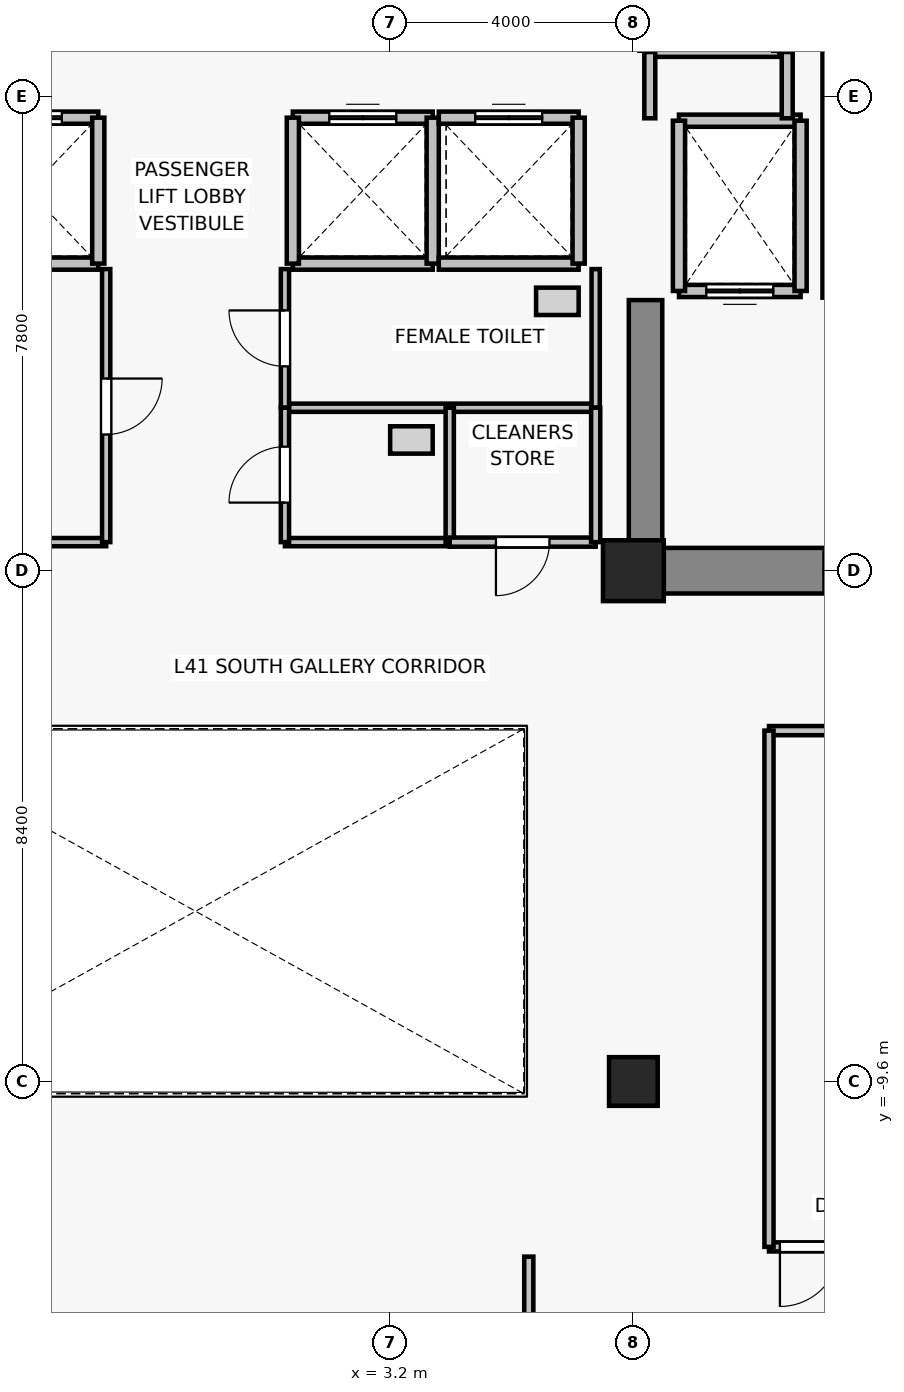
"""IFC4 building model, lengths in metres.
Left out: names, types, materials, properties, quantities, classifications, styles, units other than length and angle.
Written with IfcOpenShell. Run it as: python <this file> out.ifc"""

import sys

from ifc_helpers import new_model, si_unit, direction, frame, frame_2d, origin, origin_2d, place, context, subcontext, project, spatial, rectangle, extrude, source, transform, mapped, element, fill, save


model = new_model("IFC4")
c1 = context("Model", 3, precision=1e-05, world=origin(), true_north=direction((0.0, 1.0)))
c2 = subcontext(c1, "Body", "Model", "MODEL_VIEW")
j1 = project(units=[si_unit("LENGTHUNIT", "METRE"), si_unit("PLANEANGLEUNIT", "RADIAN")], contexts=[c1])
p1 = place(None, origin())
s1 = spatial("IfcSite", under=j1, at=p1, CompositionType="ELEMENT")
p2 = place(p1, origin())
s2 = spatial("IfcBuilding", under=s1, at=p2, CompositionType="ELEMENT")
p3 = place(p2, frame((0.0, 0.0, 149.5)))
s3 = spatial("IfcBuildingStorey", under=s2, at=p3, CompositionType="ELEMENT", Elevation=149.5)
p4 = place(p3, frame((7.2, -1.2, 0.0), z_axis=(0.0, 0.0, 1.0), x_axis=(1.0, 0.0, 0.0)))
e1 = element("IfcColumn", 1, at=p4, inside=s3, PredefinedType="COLUMN", context=c2, shape_type="SweptSolid", body=[
    extrude(rectangle(XDim=1.0, YDim=1.0, at=origin_2d()), origin(), (0.0, 0.0, 1.0), 3.3),
])
p5 = place(p3, frame((7.2, -9.6, 0.0), z_axis=(0.0, 0.0, 1.0), x_axis=(1.0, 0.0, 0.0)))
e2 = element("IfcColumn", 2, at=p5, inside=s3, PredefinedType="COLUMN", context=c2, shape_type="SweptSolid", body=[
    extrude(rectangle(XDim=0.8, YDim=0.8, at=origin_2d()), origin(), (0.0, 0.0, 1.0), 3.3),
])
p6 = place(p3, frame((13.9, -1.2, 0.0), z_axis=(0.0, 0.0, 1.0), x_axis=(-1.0, 0.0, 0.0)))
e3 = element("IfcWall", 3, at=p6, inside=s3, PredefinedType="SHEAR", context=c2, shape_type="SweptSolid", body=[
    extrude(rectangle(XDim=6.2, YDim=0.75, at=frame_2d((3.1, 0.0))), origin(), (0.0, 0.0, 1.0), 3.075),
])
p7 = place(p6, frame((2.425, 0.0, 0.0)))
e4 = element("IfcOpeningElement", 4, at=p7, cuts=e3, PredefinedType="OPENING", context=c2, shape_type="SweptSolid", body=[
    extrude(rectangle(XDim=1.15, YDim=2.15, at=frame_2d((0.575, 1.075))), frame((0.0, 0.385, 0.0), z_axis=(0.0, -1.0, 0.0), x_axis=(1.0, 0.0, 0.0)), (0.0, 0.0, 1.0), 0.77),
])
p8 = place(p3, frame((7.4, -0.825, 0.0), z_axis=(0.0, 0.0, 1.0), x_axis=(0.0, 1.0, 0.0)))
e5 = element("IfcWall", 5, at=p8, inside=s3, PredefinedType="SHEAR", context=c2, shape_type="SweptSolid", body=[
    extrude(rectangle(XDim=4.075, YDim=0.55, at=frame_2d((2.038, 0.0))), origin(), (0.0, 0.0, 1.0), 3.075),
])
p9 = place(p3, frame((9.95, 3.4, 0.0), z_axis=(0.0, 0.0, 1.0), x_axis=(-1.0, 0.0, 0.0)))
e6 = element("IfcWall", 6, at=p9, inside=s3, PredefinedType="SOLIDWALL", context=c2, shape_type="SweptSolid", body=[
    extrude(rectangle(XDim=2.0, YDim=0.2, at=frame_2d((1.0, 0.0))), origin(), (0.0, 0.0, 1.0), 3.075),
])
p10 = place(p9, frame((0.45, 0.0, 0.0)))
e7 = element("IfcOpeningElement", 7, at=p10, cuts=e6, PredefinedType="OPENING", context=c2, shape_type="SweptSolid", body=[
    extrude(rectangle(XDim=1.1, YDim=2.2, at=frame_2d((0.55, 1.1))), frame((0.0, 0.11, 0.0), z_axis=(0.0, -1.0, 0.0), x_axis=(1.0, 0.0, 0.0)), (0.0, 0.0, 1.0), 0.22),
])
p11 = place(p3, frame((7.95, 6.2, 0.0), z_axis=(0.0, 0.0, 1.0), x_axis=(1.0, 0.0, 0.0)))
e8 = element("IfcWall", 8, at=p11, inside=s3, PredefinedType="SOLIDWALL", context=c2, shape_type="SweptSolid", body=[
    extrude(rectangle(XDim=2.0, YDim=0.2, at=frame_2d((1.0, 0.0))), origin(), (0.0, 0.0, 1.0), 3.075),
])
for number, where, z_axis, x_axis in (
    (9, (7.95, 3.4, 0.0), (0.0, 0.0, 1.0), (0.0, 1.0, 0.0)),
    (10, (9.95, 6.2, 0.0), (0.0, 0.0, 1.0), (0.0, -1.0, 0.0)),
):
    element("IfcWall", number, at=place(p3, frame(where, z_axis=z_axis, x_axis=x_axis)), inside=s3, PredefinedType="SOLIDWALL", context=c2, shape_type="SweptSolid", body=[
        extrude(rectangle(XDim=2.8, YDim=0.2, at=frame_2d((1.4, 0.0))), origin(), (0.0, 0.0, 1.0), 3.075),
    ])
p12 = place(p3, frame((-1.6, 3.85, 0.0), z_axis=(0.0, 0.0, 1.0), x_axis=(-1.0, 0.0, 0.0)))
e11 = element("IfcWall", 11, at=p12, inside=s3, PredefinedType="SOLIDWALL", context=c2, shape_type="SweptSolid", body=[
    extrude(rectangle(XDim=2.3, YDim=0.2, at=frame_2d((1.15, 0.0))), origin(), (0.0, 0.0, 1.0), 3.075),
])
p13 = place(p3, frame((-3.9, 6.25, 0.0), z_axis=(0.0, 0.0, 1.0), x_axis=(1.0, 0.0, 0.0)))
e12 = element("IfcWall", 12, at=p13, inside=s3, PredefinedType="SOLIDWALL", context=c2, shape_type="SweptSolid", body=[
    extrude(rectangle(XDim=2.3, YDim=0.2, at=frame_2d((1.15, 0.0))), origin(), (0.0, 0.0, 1.0), 3.075),
])
p14 = place(p13, frame((0.6, 0.0, 0.0)))
e13 = element("IfcOpeningElement", 13, at=p14, cuts=e12, PredefinedType="OPENING", context=c2, shape_type="SweptSolid", body=[
    extrude(rectangle(XDim=1.1, YDim=2.2, at=frame_2d((0.55, 1.1))), frame((0.0, 0.11, 0.0), z_axis=(0.0, -1.0, 0.0), x_axis=(1.0, 0.0, 0.0)), (0.0, 0.0, 1.0), 0.22),
])
p15 = place(p3, frame((-1.6, 6.25, 0.0), z_axis=(0.0, 0.0, 1.0), x_axis=(0.0, -1.0, 0.0)))
e14 = element("IfcWall", 14, at=p15, inside=s3, PredefinedType="SOLIDWALL", context=c2, shape_type="SweptSolid", body=[
    extrude(rectangle(XDim=2.4, YDim=0.2, at=frame_2d((1.2, 0.0))), origin(), (0.0, 0.0, 1.0), 3.075),
])
p16 = place(p3, frame((3.9, 3.85, 0.0), z_axis=(0.0, 0.0, 1.0), x_axis=(-1.0, 0.0, 0.0)))
e15 = element("IfcWall", 15, at=p16, inside=s3, PredefinedType="SOLIDWALL", context=c2, shape_type="SweptSolid", body=[
    extrude(rectangle(XDim=2.3, YDim=0.2, at=frame_2d((1.15, 0.0))), origin(), (0.0, 0.0, 1.0), 3.075),
])
p17 = place(p3, frame((1.6, 6.25, 0.0), z_axis=(0.0, 0.0, 1.0), x_axis=(1.0, 0.0, 0.0)))
e16 = element("IfcWall", 16, at=p17, inside=s3, PredefinedType="SOLIDWALL", context=c2, shape_type="SweptSolid", body=[
    extrude(rectangle(XDim=2.3, YDim=0.2, at=frame_2d((1.15, 0.0))), origin(), (0.0, 0.0, 1.0), 3.075),
])
p18 = place(p17, frame((0.6, 0.0, 0.0)))
e17 = element("IfcOpeningElement", 17, at=p18, cuts=e16, PredefinedType="OPENING", context=c2, shape_type="SweptSolid", body=[
    extrude(rectangle(XDim=1.1, YDim=2.2, at=frame_2d((0.55, 1.1))), frame((0.0, 0.11, 0.0), z_axis=(0.0, -1.0, 0.0), x_axis=(1.0, 0.0, 0.0)), (0.0, 0.0, 1.0), 0.22),
])
for number, where, z_axis, x_axis in (
    (18, (1.6, 3.85, 0.0), (0.0, 0.0, 1.0), (0.0, 1.0, 0.0)),
    (19, (3.9, 6.25, 0.0), (0.0, 0.0, 1.0), (0.0, -1.0, 0.0)),
):
    element("IfcWall", number, at=place(p3, frame(where, z_axis=z_axis, x_axis=x_axis)), inside=s3, PredefinedType="SOLIDWALL", context=c2, shape_type="SweptSolid", body=[
        extrude(rectangle(XDim=2.4, YDim=0.2, at=frame_2d((1.2, 0.0))), origin(), (0.0, 0.0, 1.0), 3.075),
    ])
p19 = place(p3, frame((6.3, 3.85, 0.0), z_axis=(0.0, 0.0, 1.0), x_axis=(-1.0, 0.0, 0.0)))
e20 = element("IfcWall", 20, at=p19, inside=s3, PredefinedType="SOLIDWALL", context=c2, shape_type="SweptSolid", body=[
    extrude(rectangle(XDim=2.3, YDim=0.2, at=frame_2d((1.15, 0.0))), origin(), (0.0, 0.0, 1.0), 3.075),
])
p20 = place(p3, frame((4.0, 6.25, 0.0), z_axis=(0.0, 0.0, 1.0), x_axis=(1.0, 0.0, 0.0)))
e21 = element("IfcWall", 21, at=p20, inside=s3, PredefinedType="SOLIDWALL", context=c2, shape_type="SweptSolid", body=[
    extrude(rectangle(XDim=2.3, YDim=0.2, at=frame_2d((1.15, 0.0))), origin(), (0.0, 0.0, 1.0), 3.075),
])
p21 = place(p20, frame((0.6, 0.0, 0.0)))
e22 = element("IfcOpeningElement", 22, at=p21, cuts=e21, PredefinedType="OPENING", context=c2, shape_type="SweptSolid", body=[
    extrude(rectangle(XDim=1.1, YDim=2.2, at=frame_2d((0.55, 1.1))), frame((0.0, 0.11, 0.0), z_axis=(0.0, -1.0, 0.0), x_axis=(1.0, 0.0, 0.0)), (0.0, 0.0, 1.0), 0.22),
])
p22 = place(p3, frame((6.3, 6.25, 0.0), z_axis=(0.0, 0.0, 1.0), x_axis=(0.0, -1.0, 0.0)))
e23 = element("IfcWall", 23, at=p22, inside=s3, PredefinedType="SOLIDWALL", context=c2, shape_type="SweptSolid", body=[
    extrude(rectangle(XDim=2.4, YDim=0.2, at=frame_2d((1.2, 0.0))), origin(), (0.0, 0.0, 1.0), 3.075),
])
p23 = place(p3, frame((9.6, 7.35, 0.0), z_axis=(0.0, 0.0, 1.0), x_axis=(-1.0, 0.0, 0.0)))
e24 = element("IfcWall", 24, at=p23, inside=s3, PredefinedType="SOLIDWALL", context=c2, shape_type="SweptSolid", body=[
    extrude(rectangle(XDim=2.2, YDim=0.2, at=frame_2d((1.1, 0.0))), origin(), (0.0, 0.0, 1.0), 2.565),
])
p24 = place(p3, frame((10.41, 3.29, 0.0), z_axis=(0.0, 0.0, 1.0), x_axis=(0.0, 1.0, 0.0)))
e25 = element("IfcWall", 25, at=p24, inside=s3, PredefinedType="SOLIDWALL", context=c2, shape_type="SweptSolid", body=[
    extrude(rectangle(XDim=8.84, YDim=0.2, at=frame_2d((4.42, 0.0))), origin(), (0.0, 0.0, 1.0), 3.075),
])
p25 = place(p3, frame((7.47, 6.24, 0.0), z_axis=(0.0, 0.0, 1.0), x_axis=(0.0, 1.0, 0.0)))
e26 = element("IfcWall", 26, at=p25, inside=s3, PredefinedType="PARTITIONING", context=c2, shape_type="SweptSolid", body=[
    extrude(rectangle(XDim=1.09, YDim=0.18, at=frame_2d((0.545, 0.0))), origin(), (0.0, 0.0, 1.0), 2.565),
])
p26 = place(p3, frame((9.73, 7.33, 0.0), z_axis=(0.0, 0.0, 1.0), x_axis=(0.0, -1.0, 0.0)))
e27 = element("IfcWall", 27, at=p26, inside=s3, PredefinedType="PARTITIONING", context=c2, shape_type="SweptSolid", body=[
    extrude(rectangle(XDim=1.09, YDim=0.18, at=frame_2d((0.545, 0.0))), origin(), (0.0, 0.0, 1.0), 3.075),
])
p27 = place(p3, frame((-1.47, -0.73, 0.0), z_axis=(0.0, 0.0, 1.0), x_axis=(-1.0, 0.0, 0.0)))
e28 = element("IfcWall", 28, at=p27, inside=s3, PredefinedType="PARTITIONING", context=c2, shape_type="SweptSolid", body=[
    extrude(rectangle(XDim=5.11, YDim=0.135, at=frame_2d((2.555, 0.0))), origin(), (0.0, 0.0, 1.0), 3.075),
])
p28 = place(p3, frame((-1.47, 3.76, 0.0), z_axis=(0.0, 0.0, 1.0), x_axis=(0.0, -1.0, 0.0)))
e29 = element("IfcWall", 29, at=p28, inside=s3, PredefinedType="PARTITIONING", context=c2, shape_type="SweptSolid", body=[
    extrude(rectangle(XDim=4.49, YDim=0.135, at=frame_2d((2.245, 0.0))), origin(), (0.0, 0.0, 1.0), 3.075),
])
p29 = place(p28, frame((1.8, 0.0, 0.0)))
e30 = element("IfcOpeningElement", 30, at=p29, cuts=e29, PredefinedType="OPENING", context=c2, shape_type="SweptSolid", body=[
    extrude(rectangle(XDim=0.92, YDim=2.1, at=frame_2d((0.46, 1.05))), frame((0.0, 0.077, 0.0), z_axis=(0.0, -1.0, 0.0), x_axis=(1.0, 0.0, 0.0)), (0.0, 0.0, 1.0), 0.155),
])
p30 = place(p3, frame((6.58, 1.48, 0.0), z_axis=(0.0, 0.0, 1.0), x_axis=(-1.0, 0.0, 0.0)))
e31 = element("IfcWall", 31, at=p30, inside=s3, PredefinedType="PARTITIONING", context=c2, shape_type="SweptSolid", body=[
    extrude(rectangle(XDim=5.11, YDim=0.135, at=frame_2d((2.555, 0.0))), origin(), (0.0, 0.0, 1.0), 3.075),
])
p31 = place(p3, frame((1.47, 1.48, 0.0), z_axis=(0.0, 0.0, 1.0), x_axis=(0.0, 1.0, 0.0)))
e32 = element("IfcWall", 32, at=p31, inside=s3, PredefinedType="PARTITIONING", context=c2, shape_type="SweptSolid", body=[
    extrude(rectangle(XDim=2.28, YDim=0.135, at=frame_2d((1.14, 0.0))), origin(), (0.0, 0.0, 1.0), 3.075),
])
p32 = place(p31, frame((0.68, 0.0, 0.0)))
e33 = element("IfcOpeningElement", 33, at=p32, cuts=e32, PredefinedType="OPENING", context=c2, shape_type="SweptSolid", body=[
    extrude(rectangle(XDim=0.92, YDim=2.1, at=frame_2d((0.46, 1.05))), frame((0.0, 0.077, 0.0), z_axis=(0.0, -1.0, 0.0), x_axis=(1.0, 0.0, 0.0)), (0.0, 0.0, 1.0), 0.155),
])
p33 = place(p3, frame((6.58, 3.76, 0.0), z_axis=(0.0, 0.0, 1.0), x_axis=(0.0, -1.0, 0.0)))
e34 = element("IfcWall", 34, at=p33, inside=s3, PredefinedType="PARTITIONING", context=c2, shape_type="SweptSolid", body=[
    extrude(rectangle(XDim=2.28, YDim=0.135, at=frame_2d((1.14, 0.0))), origin(), (0.0, 0.0, 1.0), 3.075),
])
p34 = place(p3, frame((4.18, -0.73, 0.0), z_axis=(0.0, 0.0, 1.0), x_axis=(-1.0, 0.0, 0.0)))
e35 = element("IfcWall", 35, at=p34, inside=s3, PredefinedType="PARTITIONING", context=c2, shape_type="SweptSolid", body=[
    extrude(rectangle(XDim=2.71, YDim=0.135, at=frame_2d((1.355, 0.0))), origin(), (0.0, 0.0, 1.0), 3.075),
])
p35 = place(p3, frame((1.47, -0.73, 0.0), z_axis=(0.0, 0.0, 1.0), x_axis=(0.0, 1.0, 0.0)))
e36 = element("IfcWall", 36, at=p35, inside=s3, PredefinedType="PARTITIONING", context=c2, shape_type="SweptSolid", body=[
    extrude(rectangle(XDim=2.21, YDim=0.135, at=frame_2d((1.105, 0.0))), origin(), (0.0, 0.0, 1.0), 3.075),
])
p36 = place(p35, frame((0.65, 0.0, 0.0)))
e37 = element("IfcOpeningElement", 37, at=p36, cuts=e36, PredefinedType="OPENING", context=c2, shape_type="SweptSolid", body=[
    extrude(rectangle(XDim=0.92, YDim=2.1, at=frame_2d((0.46, 1.05))), frame((0.0, 0.077, 0.0), z_axis=(0.0, -1.0, 0.0), x_axis=(1.0, 0.0, 0.0)), (0.0, 0.0, 1.0), 0.155),
])
p37 = place(p3, frame((4.18, 1.48, 0.0), z_axis=(0.0, 0.0, 1.0), x_axis=(0.0, -1.0, 0.0)))
e38 = element("IfcWall", 38, at=p37, inside=s3, PredefinedType="PARTITIONING", context=c2, shape_type="SweptSolid", body=[
    extrude(rectangle(XDim=2.21, YDim=0.135, at=frame_2d((1.105, 0.0))), origin(), (0.0, 0.0, 1.0), 3.075),
])
p38 = place(p3, frame((6.58, -0.73, 0.0), z_axis=(0.0, 0.0, 1.0), x_axis=(-1.0, 0.0, 0.0)))
e39 = element("IfcWall", 39, at=p38, inside=s3, PredefinedType="PARTITIONING", context=c2, shape_type="SweptSolid", body=[
    extrude(rectangle(XDim=2.4, YDim=0.15, at=frame_2d((1.2, 0.0))), origin(), (0.0, 0.0, 1.0), 3.075),
])
p39 = place(p38, frame((0.76, 0.0, 0.0)))
e40 = element("IfcOpeningElement", 40, at=p39, cuts=e39, PredefinedType="OPENING", context=c2, shape_type="SweptSolid", body=[
    extrude(rectangle(XDim=0.88, YDim=2.1, at=frame_2d((0.44, 1.05))), frame((0.0, 0.085, 0.0), z_axis=(0.0, -1.0, 0.0), x_axis=(1.0, 0.0, 0.0)), (0.0, 0.0, 1.0), 0.17),
])
p40 = place(p3, frame((6.58, 1.48, 0.0), z_axis=(0.0, 0.0, 1.0), x_axis=(0.0, -1.0, 0.0)))
e41 = element("IfcWall", 41, at=p40, inside=s3, PredefinedType="PARTITIONING", context=c2, shape_type="SweptSolid", body=[
    extrude(rectangle(XDim=2.21, YDim=0.15, at=frame_2d((1.105, 0.0))), origin(), (0.0, 0.0, 1.0), 3.075),
])
p41 = place(p3, frame((22.53, -12.32, 0.0), z_axis=(0.0, 0.0, 1.0), x_axis=(-1.0, 0.0, 0.0)))
e42 = element("IfcWall", 42, at=p41, inside=s3, PredefinedType="PARTITIONING", context=c2, shape_type="SweptSolid", body=[
    extrude(rectangle(XDim=13.1, YDim=0.15, at=frame_2d((6.55, 0.0))), origin(), (0.0, 0.0, 1.0), 2.565),
])
p42 = place(p41, frame((11.94, 0.0, 0.0)))
e43 = element("IfcOpeningElement", 43, at=p42, cuts=e42, PredefinedType="OPENING", context=c2, shape_type="SweptSolid", body=[
    extrude(rectangle(XDim=0.98, YDim=2.15, at=frame_2d((0.49, 1.075))), frame((0.0, 0.085, 0.0), z_axis=(0.0, -1.0, 0.0), x_axis=(1.0, 0.0, 0.0)), (0.0, 0.0, 1.0), 0.17),
])
p43 = place(p3, frame((9.43, -3.83, 0.0), z_axis=(0.0, 0.0, 1.0), x_axis=(1.0, 0.0, 0.0)))
e44 = element("IfcWall", 44, at=p43, inside=s3, PredefinedType="PARTITIONING", context=c2, shape_type="SweptSolid", body=[
    extrude(rectangle(XDim=13.1, YDim=0.15, at=frame_2d((6.55, 0.0))), origin(), (0.0, 0.0, 1.0), 2.565),
])
p44 = place(p43, frame((5.36, 0.0, 0.0)))
e45 = element("IfcOpeningElement", 45, at=p44, cuts=e44, PredefinedType="OPENING", context=c2, shape_type="SweptSolid", body=[
    extrude(rectangle(XDim=0.98, YDim=2.15, at=frame_2d((0.49, 1.075))), frame((0.0, 0.085, 0.0), z_axis=(0.0, -1.0, 0.0), x_axis=(1.0, 0.0, 0.0)), (0.0, 0.0, 1.0), 0.17),
])
p45 = place(p3, frame((9.43, -12.32, 0.0), z_axis=(0.0, 0.0, 1.0), x_axis=(0.0, 1.0, 0.0)))
e46 = element("IfcWall", 46, at=p45, inside=s3, PredefinedType="PARTITIONING", context=c2, shape_type="SweptSolid", body=[
    extrude(rectangle(XDim=8.49, YDim=0.15, at=frame_2d((4.245, 0.0))), origin(), (0.0, 0.0, 1.0), 2.565),
])
p46 = place(p3, frame((5.48, -17.33, 0.0), z_axis=(0.0, 0.0, 1.0), x_axis=(0.0, 1.0, 0.0)))
e47 = element("IfcWall", 47, at=p46, inside=s3, PredefinedType="PARTITIONING", context=c2, shape_type="SweptSolid", body=[
    extrude(rectangle(XDim=4.85, YDim=0.15, at=frame_2d((2.425, 0.0))), origin(), (0.0, 0.0, 1.0), 2.565),
])
m1 = source(origin(), c2, "Body", "SweptSolid", [
    extrude(rectangle(XDim=1.1, YDim=2.2, at=frame_2d((0.55, 1.1))), frame((0.0, 0.025, 0.0), z_axis=(0.0, -1.0, 0.0), x_axis=(1.0, 0.0, 0.0)), (0.0, 0.0, 1.0), 0.05),
])
p47 = place(p10, origin())
e48 = element("IfcDoor", 48, at=p47, inside=s3, OperationType="DOUBLE_DOOR_SLIDING", PredefinedType="DOOR", context=c2, shape_type="MappedRepresentation", body=[
    mapped(m1, transform((0.0, 0.0, 0.0), x_axis=(1.0, 0.0, 0.0), y_axis=(0.0, 1.0, 0.0), z_axis=(0.0, 0.0, 1.0), scale=1.0)),
])
fill(e7, e48)
p48 = place(p14, origin())
e49 = element("IfcDoor", 49, at=p48, inside=s3, OperationType="DOUBLE_DOOR_SLIDING", PredefinedType="DOOR", context=c2, shape_type="MappedRepresentation", body=[
    mapped(m1, transform((0.0, 0.0, 0.0), x_axis=(1.0, 0.0, 0.0), y_axis=(0.0, 1.0, 0.0), z_axis=(0.0, 0.0, 1.0), scale=1.0)),
])
fill(e13, e49)
p49 = place(p18, origin())
e50 = element("IfcDoor", 50, at=p49, inside=s3, OperationType="DOUBLE_DOOR_SLIDING", PredefinedType="DOOR", context=c2, shape_type="MappedRepresentation", body=[
    mapped(m1, transform((0.0, 0.0, 0.0), x_axis=(1.0, 0.0, 0.0), y_axis=(0.0, 1.0, 0.0), z_axis=(0.0, 0.0, 1.0), scale=1.0)),
])
fill(e17, e50)
p50 = place(p21, origin())
e51 = element("IfcDoor", 51, at=p50, inside=s3, OperationType="DOUBLE_DOOR_SLIDING", PredefinedType="DOOR", context=c2, shape_type="MappedRepresentation", body=[
    mapped(m1, transform((0.0, 0.0, 0.0), x_axis=(1.0, 0.0, 0.0), y_axis=(0.0, 1.0, 0.0), z_axis=(0.0, 0.0, 1.0), scale=1.0)),
])
fill(e22, e51)
m2 = source(origin(), c2, "Body", "SweptSolid", [
    extrude(rectangle(XDim=1.15, YDim=2.15, at=frame_2d((0.575, 1.075))), frame((0.0, 0.025, 0.0), z_axis=(0.0, -1.0, 0.0), x_axis=(1.0, 0.0, 0.0)), (0.0, 0.0, 1.0), 0.05),
])
p51 = place(p7, origin())
e52 = element("IfcDoor", 52, at=p51, inside=s3, OperationType="SINGLE_SWING_LEFT", PredefinedType="DOOR", context=c2, shape_type="MappedRepresentation", body=[
    mapped(m2, transform((0.0, 0.0, 0.0), x_axis=(1.0, 0.0, 0.0), y_axis=(0.0, 1.0, 0.0), z_axis=(0.0, 0.0, 1.0), scale=1.0)),
])
fill(e4, e52)
m3 = source(origin(), c2, "Body", "SweptSolid", [
    extrude(rectangle(XDim=0.92, YDim=2.1, at=frame_2d((0.46, 1.05))), frame((0.0, 0.025, 0.0), z_axis=(0.0, -1.0, 0.0), x_axis=(1.0, 0.0, 0.0)), (0.0, 0.0, 1.0), 0.05),
])
p52 = place(p29, origin())
e53 = element("IfcDoor", 53, at=p52, inside=s3, OperationType="SINGLE_SWING_LEFT", PredefinedType="DOOR", context=c2, shape_type="MappedRepresentation", body=[
    mapped(m3, transform((0.0, 0.0, 0.0), x_axis=(1.0, 0.0, 0.0), y_axis=(0.0, 1.0, 0.0), z_axis=(0.0, 0.0, 1.0), scale=1.0)),
])
fill(e30, e53)
p53 = place(p32, origin())
e54 = element("IfcDoor", 54, at=p53, inside=s3, OperationType="SINGLE_SWING_RIGHT", PredefinedType="DOOR", context=c2, shape_type="MappedRepresentation", body=[
    mapped(m3, transform((0.0, 0.0, 0.0), x_axis=(1.0, 0.0, 0.0), y_axis=(0.0, 1.0, 0.0), z_axis=(0.0, 0.0, 1.0), scale=1.0)),
])
fill(e33, e54)
p54 = place(p36, origin())
e55 = element("IfcDoor", 55, at=p54, inside=s3, OperationType="SINGLE_SWING_LEFT", PredefinedType="DOOR", context=c2, shape_type="MappedRepresentation", body=[
    mapped(m3, transform((0.0, 0.0, 0.0), x_axis=(1.0, 0.0, 0.0), y_axis=(0.0, 1.0, 0.0), z_axis=(0.0, 0.0, 1.0), scale=1.0)),
])
fill(e37, e55)
m4 = source(origin(), c2, "Body", "SweptSolid", [
    extrude(rectangle(XDim=0.88, YDim=2.1, at=frame_2d((0.44, 1.05))), frame((0.0, 0.025, 0.0), z_axis=(0.0, -1.0, 0.0), x_axis=(1.0, 0.0, 0.0)), (0.0, 0.0, 1.0), 0.05),
])
p55 = place(p39, origin())
e56 = element("IfcDoor", 56, at=p55, inside=s3, OperationType="SINGLE_SWING_RIGHT", PredefinedType="DOOR", context=c2, shape_type="MappedRepresentation", body=[
    mapped(m4, transform((0.0, 0.0, 0.0), x_axis=(1.0, 0.0, 0.0), y_axis=(0.0, 1.0, 0.0), z_axis=(0.0, 0.0, 1.0), scale=1.0)),
])
fill(e40, e56)
m5 = source(origin(), c2, "Body", "SweptSolid", [
    extrude(rectangle(XDim=0.98, YDim=2.15, at=frame_2d((0.49, 1.075))), frame((0.0, 0.025, 0.0), z_axis=(0.0, -1.0, 0.0), x_axis=(1.0, 0.0, 0.0)), (0.0, 0.0, 1.0), 0.05),
])
p56 = place(p42, origin())
e57 = element("IfcDoor", 57, at=p56, inside=s3, OperationType="SINGLE_SWING_RIGHT", PredefinedType="DOOR", context=c2, shape_type="MappedRepresentation", body=[
    mapped(m5, transform((0.0, 0.0, 0.0), x_axis=(1.0, 0.0, 0.0), y_axis=(0.0, 1.0, 0.0), z_axis=(0.0, 0.0, 1.0), scale=1.0)),
])
fill(e43, e57)
save(model, sys.argv[1])
